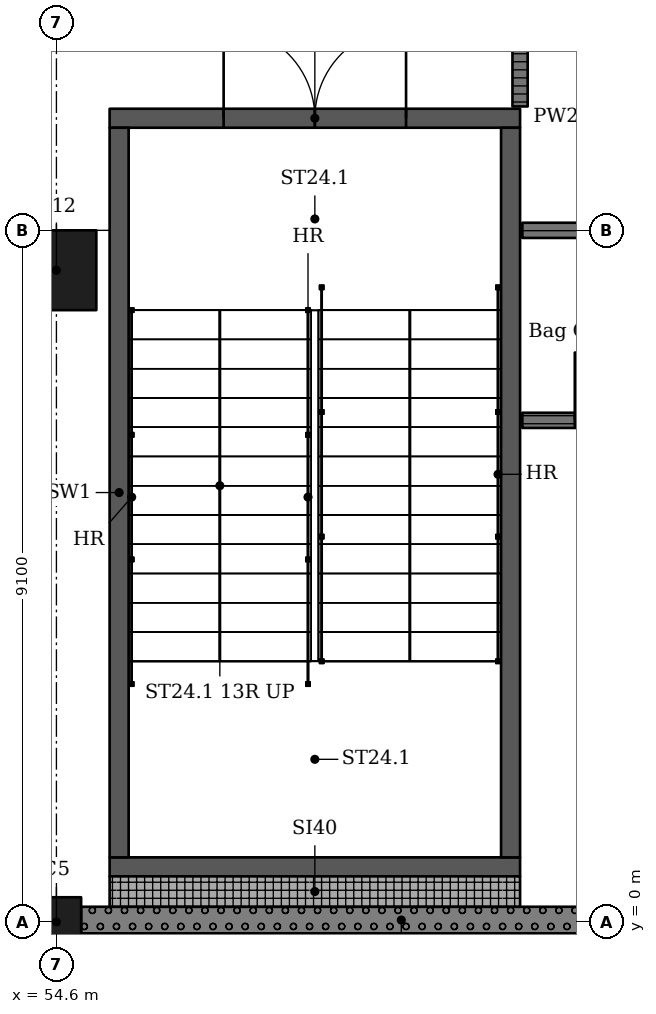
"""IFC4 building model, lengths in metres.
Left out: names, types, materials, properties, quantities, classifications, styles, units other than length and angle.
Written with IfcOpenShell. Run it as: python <this file> out.ifc"""

import sys

from ifc_helpers import new_model, si_unit, direction, frame, frame_2d, origin, origin_2d, place, context, subcontext, project, spatial, rectangle, extrude, element, fill, save


model = new_model("IFC4")
c1 = context("Model", 3, precision=1e-05, world=origin(), true_north=direction((0.0, 1.0)))
c2 = subcontext(c1, "Body", "Model", "MODEL_VIEW")
j1 = project(units=[si_unit("LENGTHUNIT", "METRE"), si_unit("PLANEANGLEUNIT", "RADIAN")], contexts=[c1])
p1 = place(None, origin())
s1 = spatial("IfcSite", under=j1, at=p1, CompositionType="ELEMENT")
p2 = place(p1, origin())
s2 = spatial("IfcBuilding", under=s1, at=p2, CompositionType="ELEMENT")
p3 = place(p2, origin())
s3 = spatial("IfcBuildingStorey", under=s2, at=p3, CompositionType="ELEMENT", Elevation=0.0)
p4 = place(p3, frame((54.6, 0.0, -0.4), z_axis=(0.0, 0.0, 1.0), x_axis=(1.0, 0.0, 0.0)))
e1 = element("IfcColumn", 1, at=p4, inside=s3, PredefinedType="COLUMN", context=c2, shape_type="SweptSolid", body=[
    extrude(rectangle(XDim=0.65, YDim=0.65, at=origin_2d()), origin(), (0.0, 0.0, 1.0), 6.77),
])
p5 = place(p3, frame((54.6, 8.575, -0.4), z_axis=(0.0, 0.0, 1.0), x_axis=(1.0, 0.0, 0.0)))
e2 = element("IfcColumn", 2, at=p5, inside=s3, PredefinedType="COLUMN", context=c2, shape_type="SweptSolid", body=[
    extrude(rectangle(XDim=1.05, YDim=1.05, at=origin_2d()), origin(), (0.0, 0.0, 1.0), 6.77),
])
p6 = place(p3, frame((60.7, 0.725, -0.4), z_axis=(0.0, 0.0, 1.0), x_axis=(-1.0, 0.0, 0.0)))
e3 = element("IfcWall", 3, at=p6, inside=s3, PredefinedType="SHEAR", context=c2, shape_type="SweptSolid", body=[
    extrude(rectangle(XDim=5.4, YDim=0.25, at=frame_2d((2.7, 0.0))), origin(), (0.0, 0.0, 1.0), 6.77),
])
p7 = place(p3, frame((60.7, 10.575, -0.4), z_axis=(0.0, 0.0, 1.0), x_axis=(-1.0, 0.0, 0.0)))
e4 = element("IfcWall", 4, at=p7, inside=s3, PredefinedType="SHEAR", context=c2, shape_type="SweptSolid", body=[
    extrude(rectangle(XDim=5.4, YDim=0.25, at=frame_2d((2.7, 0.0))), origin(), (0.0, 0.0, 1.0), 6.77),
])
p8 = place(p7, frame((1.5, 0.0, 0.4)))
e5 = element("IfcOpeningElement", 5, at=p8, cuts=e4, PredefinedType="OPENING", context=c2, shape_type="SweptSolid", body=[
    extrude(rectangle(XDim=2.4, YDim=2.1, at=frame_2d((1.2, 1.05))), frame((0.0, 0.135, 0.0), z_axis=(0.0, -1.0, 0.0), x_axis=(1.0, 0.0, 0.0)), (0.0, 0.0, 1.0), 0.27),
])
for number, where, z_axis, x_axis in (
    (6, (55.425, 10.45, -0.4), (0.0, 0.0, 1.0), (0.0, -1.0, 0.0)),
    (7, (60.575, 10.45, -0.4), (0.0, 0.0, 1.0), (0.0, -1.0, 0.0)),
):
    element("IfcWall", number, at=place(p3, frame(where, z_axis=z_axis, x_axis=x_axis)), inside=s3, PredefinedType="SHEAR", context=c2, shape_type="SweptSolid", body=[
        extrude(rectangle(XDim=9.6, YDim=0.25, at=frame_2d((4.8, 0.0))), origin(), (0.0, 0.0, 1.0), 6.77),
    ])
p9 = place(p3, frame((54.925, 0.025, 0.0), z_axis=(0.0, 0.0, 1.0), x_axis=(1.0, 0.0, 0.0)))
e8 = element("IfcWall", 8, at=p9, inside=s3, PredefinedType="SOLIDWALL", context=c2, shape_type="SweptSolid", body=[
    extrude(rectangle(XDim=8.425, YDim=0.35, at=frame_2d((4.212, 0.0))), origin(), (0.0, 0.0, 1.0), 5.27),
])
p10 = place(p3, frame((55.3, 0.4, 0.0), z_axis=(0.0, 0.0, 1.0), x_axis=(1.0, 0.0, 0.0)))
e9 = element("IfcWall", 9, at=p10, inside=s3, PredefinedType="SOLIDWALL", context=c2, shape_type="SweptSolid", body=[
    extrude(rectangle(XDim=5.4, YDim=0.4, at=frame_2d((2.7, 0.0))), origin(), (0.0, 0.0, 1.0), 6.02),
])
p11 = place(p3, frame((60.7, 18.1, 0.0), z_axis=(0.0, 0.0, 1.0), x_axis=(0.0, -1.0, 0.0)))
e10 = element("IfcWall", 10, at=p11, inside=s3, PredefinedType="PARTITIONING", context=c2, shape_type="SweptSolid", body=[
    extrude(rectangle(XDim=7.37, YDim=0.2, at=frame_2d((3.685, 0.0))), origin(), (0.0, 0.0, 1.0), 6.02),
])
p12 = place(p11, frame((2.15, 0.0, 0.0)))
e11 = element("IfcOpeningElement", 11, at=p12, cuts=e10, PredefinedType="OPENING", context=c2, shape_type="SweptSolid", body=[
    extrude(rectangle(XDim=3.0, YDim=2.4, at=frame_2d((1.5, 1.2))), frame((0.0, 0.11, 0.0), z_axis=(0.0, -1.0, 0.0), x_axis=(1.0, 0.0, 0.0)), (0.0, 0.0, 1.0), 0.22),
])
p13 = place(p3, frame((63.25, 9.1, 0.0), z_axis=(0.0, 0.0, 1.0), x_axis=(-1.0, 0.0, 0.0)))
e12 = element("IfcWall", 12, at=p13, inside=s3, PredefinedType="PARTITIONING", context=c2, shape_type="SweptSolid", body=[
    extrude(rectangle(XDim=2.52, YDim=0.2, at=frame_2d((1.26, 0.0))), origin(), (0.0, 0.0, 1.0), 5.57),
])
p14 = place(p3, frame((82.57, 6.6, 0.0), z_axis=(0.0, 0.0, 1.0), x_axis=(-1.0, 0.0, 0.0)))
e13 = element("IfcWall", 13, at=p14, inside=s3, PredefinedType="PARTITIONING", context=c2, shape_type="SweptSolid", body=[
    extrude(rectangle(XDim=21.84, YDim=0.2, at=frame_2d((10.92, 0.0))), origin(), (0.0, 0.0, 1.0), 6.02),
])
p15 = place(p14, frame((0.65, 0.0, 0.0)))
e14 = element("IfcOpeningElement", 14, at=p15, cuts=e13, PredefinedType="OPENING", context=c2, shape_type="SweptSolid", body=[
    extrude(rectangle(XDim=1.8, YDim=2.4, at=frame_2d((0.9, 1.2))), frame((0.0, 0.11, 0.0), z_axis=(0.0, -1.0, 0.0), x_axis=(1.0, 0.0, 0.0)), (0.0, 0.0, 1.0), 0.22),
])
p16 = place(p14, frame((3.75, 0.0, 0.0)))
e15 = element("IfcOpeningElement", 15, at=p16, cuts=e13, PredefinedType="OPENING", context=c2, shape_type="SweptSolid", body=[
    extrude(rectangle(XDim=1.8, YDim=2.4, at=frame_2d((0.9, 1.2))), frame((0.0, 0.11, 0.0), z_axis=(0.0, -1.0, 0.0), x_axis=(1.0, 0.0, 0.0)), (0.0, 0.0, 1.0), 0.22),
])
p17 = place(p14, frame((6.95, 0.0, 0.0)))
e16 = element("IfcOpeningElement", 16, at=p17, cuts=e13, PredefinedType="OPENING", context=c2, shape_type="SweptSolid", body=[
    extrude(rectangle(XDim=1.8, YDim=2.4, at=frame_2d((0.9, 1.2))), frame((0.0, 0.11, 0.0), z_axis=(0.0, -1.0, 0.0), x_axis=(1.0, 0.0, 0.0)), (0.0, 0.0, 1.0), 0.22),
])
p18 = place(p14, frame((10.05, 0.0, 0.0)))
e17 = element("IfcOpeningElement", 17, at=p18, cuts=e13, PredefinedType="OPENING", context=c2, shape_type="SweptSolid", body=[
    extrude(rectangle(XDim=1.8, YDim=2.4, at=frame_2d((0.9, 1.2))), frame((0.0, 0.11, 0.0), z_axis=(0.0, -1.0, 0.0), x_axis=(1.0, 0.0, 0.0)), (0.0, 0.0, 1.0), 0.22),
])
p19 = place(p14, frame((13.15, 0.0, 0.0)))
e18 = element("IfcOpeningElement", 18, at=p19, cuts=e13, PredefinedType="OPENING", context=c2, shape_type="SweptSolid", body=[
    extrude(rectangle(XDim=1.8, YDim=2.4, at=frame_2d((0.9, 1.2))), frame((0.0, 0.11, 0.0), z_axis=(0.0, -1.0, 0.0), x_axis=(1.0, 0.0, 0.0)), (0.0, 0.0, 1.0), 0.22),
])
p20 = place(p14, frame((16.25, 0.0, 0.0)))
e19 = element("IfcOpeningElement", 19, at=p20, cuts=e13, PredefinedType="OPENING", context=c2, shape_type="SweptSolid", body=[
    extrude(rectangle(XDim=1.8, YDim=2.4, at=frame_2d((0.9, 1.2))), frame((0.0, 0.11, 0.0), z_axis=(0.0, -1.0, 0.0), x_axis=(1.0, 0.0, 0.0)), (0.0, 0.0, 1.0), 0.22),
])
p21 = place(p14, frame((19.35, 0.0, 0.0)))
e20 = element("IfcOpeningElement", 20, at=p21, cuts=e13, PredefinedType="OPENING", context=c2, shape_type="SweptSolid", body=[
    extrude(rectangle(XDim=1.8, YDim=2.4, at=frame_2d((0.9, 1.2))), frame((0.0, 0.11, 0.0), z_axis=(0.0, -1.0, 0.0), x_axis=(1.0, 0.0, 0.0)), (0.0, 0.0, 1.0), 0.22),
])
p22 = place(p21, origin())
e21 = element("IfcDoor", 21, at=p22, inside=s3, OperationType="DOUBLE_DOOR_SINGLE_SWING", PredefinedType="DOOR", context=c2, shape_type="SweptSolid", body=[
    extrude(rectangle(XDim=1.8, YDim=2.4, at=frame_2d((0.9, 1.2))), frame((0.0, 0.025, 0.0), z_axis=(0.0, -1.0, 0.0), x_axis=(1.0, 0.0, 0.0)), (0.0, 0.0, 1.0), 0.05),
])
fill(e20, e21)
p23 = place(p8, origin())
e22 = element("IfcDoor", 22, at=p23, inside=s3, OperationType="DOUBLE_DOOR_SINGLE_SWING", PredefinedType="DOOR", context=c2, shape_type="SweptSolid", body=[
    extrude(rectangle(XDim=2.4, YDim=2.1, at=frame_2d((1.2, 1.05))), frame((0.0, 0.025, 0.0), z_axis=(0.0, -1.0, 0.0), x_axis=(1.0, 0.0, 0.0)), (0.0, 0.0, 1.0), 0.05),
])
fill(e5, e22)
save(model, sys.argv[1])
